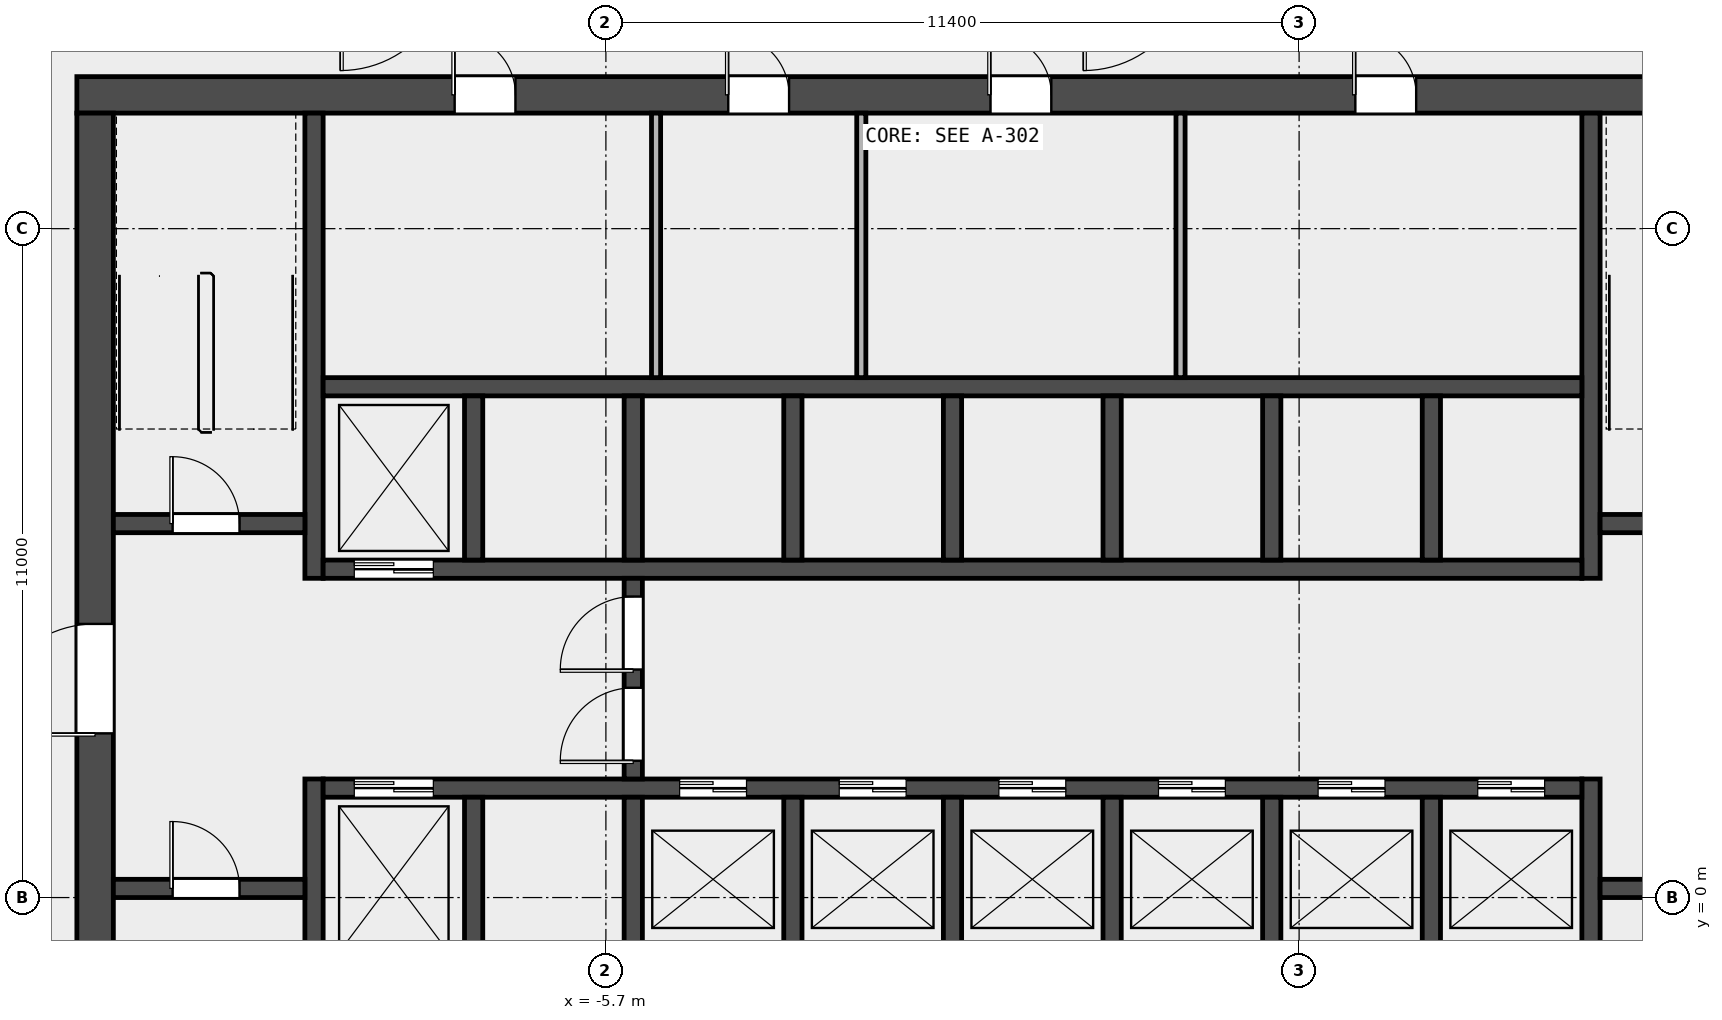
"""IFC4 building model, lengths in metres.
Left out: names, types, materials, properties, quantities, classifications, styles, units other than length and angle.
Written with IfcOpenShell. Run it as: python <this file> out.ifc"""

import sys

from ifc_helpers import new_model, si_unit, direction, frame, frame_2d, origin, place, context, subcontext, project, spatial, rectangle, extrude, element, fill, save


model = new_model("IFC4")
c1 = context("Model", 3, precision=1e-05, world=origin(), true_north=direction((0.0, 1.0)))
c2 = subcontext(c1, "Body", "Model", "MODEL_VIEW")
j1 = project(units=[si_unit("LENGTHUNIT", "METRE"), si_unit("PLANEANGLEUNIT", "RADIAN")], contexts=[c1])
p1 = place(None, origin())
s1 = spatial("IfcSite", under=j1, at=p1, CompositionType="ELEMENT")
p2 = place(p1, origin())
s2 = spatial("IfcBuilding", under=s1, at=p2, CompositionType="ELEMENT")
p3 = place(p2, frame((0.0, 0.0, 14.5)))
s3 = spatial("IfcBuildingStorey", under=s2, at=p3, CompositionType="ELEMENT", Elevation=14.5)
p4 = place(p3, frame((-14.4, 13.2, 0.0), z_axis=(0.0, 0.0, 1.0), x_axis=(1.0, 0.0, 0.0)))
e1 = element("IfcWall", 1, at=p4, inside=s3, PredefinedType="SHEAR", context=c2, shape_type="SweptSolid", body=[
    extrude(rectangle(XDim=28.8, YDim=0.6, at=frame_2d((14.4, 0.0))), origin(), (0.0, 0.0, 1.0), 5.2),
])
p5 = place(p4, frame((6.212, 0.0, 0.0)))
e2 = element("IfcOpeningElement", 2, at=p5, cuts=e1, PredefinedType="OPENING", context=c2, shape_type="SweptSolid", body=[
    extrude(rectangle(XDim=1.0, YDim=2.1, at=frame_2d((0.5, 1.05))), frame((0.0, 0.312, 0.0), z_axis=(0.0, -1.0, 0.0), x_axis=(1.0, 0.0, 0.0)), (0.0, 0.0, 1.0), 0.624),
])
p6 = place(p4, frame((10.712, 0.0, 0.0)))
e3 = element("IfcOpeningElement", 3, at=p6, cuts=e1, PredefinedType="OPENING", context=c2, shape_type="SweptSolid", body=[
    extrude(rectangle(XDim=1.0, YDim=2.1, at=frame_2d((0.5, 1.05))), frame((0.0, 0.312, 0.0), z_axis=(0.0, -1.0, 0.0), x_axis=(1.0, 0.0, 0.0)), (0.0, 0.0, 1.0), 0.624),
])
p7 = place(p4, frame((15.025, 0.0, 0.0)))
e4 = element("IfcOpeningElement", 4, at=p7, cuts=e1, PredefinedType="OPENING", context=c2, shape_type="SweptSolid", body=[
    extrude(rectangle(XDim=1.0, YDim=2.1, at=frame_2d((0.5, 1.05))), frame((0.0, 0.312, 0.0), z_axis=(0.0, -1.0, 0.0), x_axis=(1.0, 0.0, 0.0)), (0.0, 0.0, 1.0), 0.624),
])
p8 = place(p4, frame((21.025, 0.0, 0.0)))
e5 = element("IfcOpeningElement", 5, at=p8, cuts=e1, PredefinedType="OPENING", context=c2, shape_type="SweptSolid", body=[
    extrude(rectangle(XDim=1.0, YDim=2.1, at=frame_2d((0.5, 1.05))), frame((0.0, 0.312, 0.0), z_axis=(0.0, -1.0, 0.0), x_axis=(1.0, 0.0, 0.0)), (0.0, 0.0, 1.0), 0.624),
])
p9 = place(p3, frame((-14.1, -6.6, 0.0), z_axis=(0.0, 0.0, 1.0), x_axis=(0.0, 1.0, 0.0)))
e6 = element("IfcWall", 6, at=p9, inside=s3, PredefinedType="SHEAR", context=c2, shape_type="SweptSolid", body=[
    extrude(rectangle(XDim=19.5, YDim=0.6, at=frame_2d((9.75, 0.0))), origin(), (0.0, 0.0, 1.0), 5.2),
])
p10 = place(p9, frame((9.3, 0.0, 0.0)))
e7 = element("IfcOpeningElement", 7, at=p10, cuts=e6, PredefinedType="OPENING", context=c2, shape_type="SweptSolid", body=[
    extrude(rectangle(XDim=1.8, YDim=2.1, at=frame_2d((0.9, 1.05))), frame((0.0, 0.312, 0.0), z_axis=(0.0, -1.0, 0.0), x_axis=(1.0, 0.0, 0.0)), (0.0, 0.0, 1.0), 0.624),
])
p11 = place(p3, frame((-10.5, -6.6, 0.0), z_axis=(0.0, 0.0, 1.0), x_axis=(0.0, 1.0, 0.0)))
e8 = element("IfcWall", 8, at=p11, inside=s3, PredefinedType="SHEAR", context=c2, shape_type="SweptSolid", body=[
    extrude(rectangle(XDim=8.55, YDim=0.3, at=frame_2d((4.275, 0.0))), origin(), (0.0, 0.0, 1.0), 5.2),
])
p12 = place(p3, frame((-10.5, 5.25, 0.0), z_axis=(0.0, 0.0, 1.0), x_axis=(0.0, 1.0, 0.0)))
e9 = element("IfcWall", 9, at=p12, inside=s3, PredefinedType="SHEAR", context=c2, shape_type="SweptSolid", body=[
    extrude(rectangle(XDim=7.65, YDim=0.3, at=frame_2d((3.825, 0.0))), origin(), (0.0, 0.0, 1.0), 5.2),
])
p13 = place(p3, frame((10.5, -6.6, 0.0), z_axis=(0.0, 0.0, 1.0), x_axis=(0.0, 1.0, 0.0)))
e10 = element("IfcWall", 10, at=p13, inside=s3, PredefinedType="SHEAR", context=c2, shape_type="SweptSolid", body=[
    extrude(rectangle(XDim=8.55, YDim=0.3, at=frame_2d((4.275, 0.0))), origin(), (0.0, 0.0, 1.0), 5.2),
])
p14 = place(p3, frame((10.5, 5.25, 0.0), z_axis=(0.0, 0.0, 1.0), x_axis=(0.0, 1.0, 0.0)))
e11 = element("IfcWall", 11, at=p14, inside=s3, PredefinedType="SHEAR", context=c2, shape_type="SweptSolid", body=[
    extrude(rectangle(XDim=7.65, YDim=0.3, at=frame_2d((3.825, 0.0))), origin(), (0.0, 0.0, 1.0), 5.2),
])
p15 = place(p3, frame((-13.8, 0.15, 0.0), z_axis=(0.0, 0.0, 1.0), x_axis=(1.0, 0.0, 0.0)))
e12 = element("IfcWall", 12, at=p15, inside=s3, PredefinedType="SOLIDWALL", context=c2, shape_type="SweptSolid", body=[
    extrude(rectangle(XDim=3.15, YDim=0.3, at=frame_2d((1.575, 0.0))), origin(), (0.0, 0.0, 1.0), 5.2),
])
p16 = place(p15, frame((0.975, 0.0, 0.0)))
e13 = element("IfcOpeningElement", 13, at=p16, cuts=e12, PredefinedType="OPENING", context=c2, shape_type="SweptSolid", body=[
    extrude(rectangle(XDim=1.1, YDim=2.1, at=frame_2d((0.55, 1.05))), frame((0.0, 0.162, 0.0), z_axis=(0.0, -1.0, 0.0), x_axis=(1.0, 0.0, 0.0)), (0.0, 0.0, 1.0), 0.324),
])
p17 = place(p3, frame((-13.8, 6.15, 0.0), z_axis=(0.0, 0.0, 1.0), x_axis=(1.0, 0.0, 0.0)))
e14 = element("IfcWall", 14, at=p17, inside=s3, PredefinedType="SOLIDWALL", context=c2, shape_type="SweptSolid", body=[
    extrude(rectangle(XDim=3.15, YDim=0.3, at=frame_2d((1.575, 0.0))), origin(), (0.0, 0.0, 1.0), 5.2),
])
p18 = place(p17, frame((0.975, 0.0, 0.0)))
e15 = element("IfcOpeningElement", 15, at=p18, cuts=e14, PredefinedType="OPENING", context=c2, shape_type="SweptSolid", body=[
    extrude(rectangle(XDim=1.1, YDim=2.1, at=frame_2d((0.55, 1.05))), frame((0.0, 0.162, 0.0), z_axis=(0.0, -1.0, 0.0), x_axis=(1.0, 0.0, 0.0)), (0.0, 0.0, 1.0), 0.324),
])
p19 = place(p3, frame((10.65, 0.15, 0.0), z_axis=(0.0, 0.0, 1.0), x_axis=(1.0, 0.0, 0.0)))
e16 = element("IfcWall", 16, at=p19, inside=s3, PredefinedType="SOLIDWALL", context=c2, shape_type="SweptSolid", body=[
    extrude(rectangle(XDim=3.15, YDim=0.3, at=frame_2d((1.575, 0.0))), origin(), (0.0, 0.0, 1.0), 5.2),
])
p20 = place(p19, frame((1.025, 0.0, 0.0)))
e17 = element("IfcOpeningElement", 17, at=p20, cuts=e16, PredefinedType="OPENING", context=c2, shape_type="SweptSolid", body=[
    extrude(rectangle(XDim=1.1, YDim=2.1, at=frame_2d((0.55, 1.05))), frame((0.0, 0.162, 0.0), z_axis=(0.0, -1.0, 0.0), x_axis=(1.0, 0.0, 0.0)), (0.0, 0.0, 1.0), 0.324),
])
p21 = place(p3, frame((10.65, 6.15, 0.0), z_axis=(0.0, 0.0, 1.0), x_axis=(1.0, 0.0, 0.0)))
e18 = element("IfcWall", 18, at=p21, inside=s3, PredefinedType="SOLIDWALL", context=c2, shape_type="SweptSolid", body=[
    extrude(rectangle(XDim=3.15, YDim=0.3, at=frame_2d((1.575, 0.0))), origin(), (0.0, 0.0, 1.0), 5.2),
])
p22 = place(p21, frame((1.025, 0.0, 0.0)))
e19 = element("IfcOpeningElement", 19, at=p22, cuts=e18, PredefinedType="OPENING", context=c2, shape_type="SweptSolid", body=[
    extrude(rectangle(XDim=1.1, YDim=2.1, at=frame_2d((0.55, 1.05))), frame((0.0, 0.162, 0.0), z_axis=(0.0, -1.0, 0.0), x_axis=(1.0, 0.0, 0.0)), (0.0, 0.0, 1.0), 0.324),
])
p23 = place(p3, frame((-10.35, 1.8, 0.0), z_axis=(0.0, 0.0, 1.0), x_axis=(1.0, 0.0, 0.0)))
e20 = element("IfcWall", 20, at=p23, inside=s3, PredefinedType="SOLIDWALL", context=c2, shape_type="SweptSolid", body=[
    extrude(rectangle(XDim=20.7, YDim=0.3, at=frame_2d((10.35, 0.0))), origin(), (0.0, 0.0, 1.0), 5.2),
])
p24 = place(p23, frame((0.512, 0.0, 0.0)))
e21 = element("IfcOpeningElement", 21, at=p24, cuts=e20, PredefinedType="OPENING", context=c2, shape_type="SweptSolid", body=[
    extrude(rectangle(XDim=1.3, YDim=2.1, at=frame_2d((0.65, 1.05))), frame((0.0, 0.162, 0.0), z_axis=(0.0, -1.0, 0.0), x_axis=(1.0, 0.0, 0.0)), (0.0, 0.0, 1.0), 0.324),
])
p25 = place(p23, frame((5.863, 0.0, 0.0)))
e22 = element("IfcOpeningElement", 22, at=p25, cuts=e20, PredefinedType="OPENING", context=c2, shape_type="SweptSolid", body=[
    extrude(rectangle(XDim=1.1, YDim=2.1, at=frame_2d((0.55, 1.05))), frame((0.0, 0.162, 0.0), z_axis=(0.0, -1.0, 0.0), x_axis=(1.0, 0.0, 0.0)), (0.0, 0.0, 1.0), 0.324),
])
p26 = place(p23, frame((8.488, 0.0, 0.0)))
e23 = element("IfcOpeningElement", 23, at=p26, cuts=e20, PredefinedType="OPENING", context=c2, shape_type="SweptSolid", body=[
    extrude(rectangle(XDim=1.1, YDim=2.1, at=frame_2d((0.55, 1.05))), frame((0.0, 0.162, 0.0), z_axis=(0.0, -1.0, 0.0), x_axis=(1.0, 0.0, 0.0)), (0.0, 0.0, 1.0), 0.324),
])
p27 = place(p23, frame((11.113, 0.0, 0.0)))
e24 = element("IfcOpeningElement", 24, at=p27, cuts=e20, PredefinedType="OPENING", context=c2, shape_type="SweptSolid", body=[
    extrude(rectangle(XDim=1.1, YDim=2.1, at=frame_2d((0.55, 1.05))), frame((0.0, 0.162, 0.0), z_axis=(0.0, -1.0, 0.0), x_axis=(1.0, 0.0, 0.0)), (0.0, 0.0, 1.0), 0.324),
])
p28 = place(p23, frame((13.738, 0.0, 0.0)))
e25 = element("IfcOpeningElement", 25, at=p28, cuts=e20, PredefinedType="OPENING", context=c2, shape_type="SweptSolid", body=[
    extrude(rectangle(XDim=1.1, YDim=2.1, at=frame_2d((0.55, 1.05))), frame((0.0, 0.162, 0.0), z_axis=(0.0, -1.0, 0.0), x_axis=(1.0, 0.0, 0.0)), (0.0, 0.0, 1.0), 0.324),
])
p29 = place(p23, frame((16.363, 0.0, 0.0)))
e26 = element("IfcOpeningElement", 26, at=p29, cuts=e20, PredefinedType="OPENING", context=c2, shape_type="SweptSolid", body=[
    extrude(rectangle(XDim=1.1, YDim=2.1, at=frame_2d((0.55, 1.05))), frame((0.0, 0.162, 0.0), z_axis=(0.0, -1.0, 0.0), x_axis=(1.0, 0.0, 0.0)), (0.0, 0.0, 1.0), 0.324),
])
p30 = place(p23, frame((18.988, 0.0, 0.0)))
e27 = element("IfcOpeningElement", 27, at=p30, cuts=e20, PredefinedType="OPENING", context=c2, shape_type="SweptSolid", body=[
    extrude(rectangle(XDim=1.1, YDim=2.1, at=frame_2d((0.55, 1.05))), frame((0.0, 0.162, 0.0), z_axis=(0.0, -1.0, 0.0), x_axis=(1.0, 0.0, 0.0)), (0.0, 0.0, 1.0), 0.324),
])
p31 = place(p3, frame((-10.35, 5.4, 0.0), z_axis=(0.0, 0.0, 1.0), x_axis=(1.0, 0.0, 0.0)))
e28 = element("IfcWall", 28, at=p31, inside=s3, PredefinedType="SOLIDWALL", context=c2, shape_type="SweptSolid", body=[
    extrude(rectangle(XDim=20.7, YDim=0.3, at=frame_2d((10.35, 0.0))), origin(), (0.0, 0.0, 1.0), 5.2),
])
p32 = place(p31, frame((0.512, 0.0, 0.0)))
e29 = element("IfcOpeningElement", 29, at=p32, cuts=e28, PredefinedType="OPENING", context=c2, shape_type="SweptSolid", body=[
    extrude(rectangle(XDim=1.3, YDim=2.1, at=frame_2d((0.65, 1.05))), frame((0.0, 0.162, 0.0), z_axis=(0.0, -1.0, 0.0), x_axis=(1.0, 0.0, 0.0)), (0.0, 0.0, 1.0), 0.324),
])
p33 = place(p3, frame((-10.35, 8.4, 0.0), z_axis=(0.0, 0.0, 1.0), x_axis=(1.0, 0.0, 0.0)))
e30 = element("IfcWall", 30, at=p33, inside=s3, PredefinedType="SOLIDWALL", context=c2, shape_type="SweptSolid", body=[
    extrude(rectangle(XDim=20.7, YDim=0.3, at=frame_2d((10.35, 0.0))), origin(), (0.0, 0.0, 1.0), 5.2),
])
for number, where, z_axis, x_axis in (
    (31, (-7.875, -1.05, 0.0), (0.0, 0.0, 1.0), (0.0, 1.0, 0.0)),
    (32, (-5.25, -1.05, 0.0), (0.0, 0.0, 1.0), (0.0, 1.0, 0.0)),
    (33, (-2.625, -1.05, 0.0), (0.0, 0.0, 1.0), (0.0, 1.0, 0.0)),
    (34, (0.0, -1.05, 0.0), (0.0, 0.0, 1.0), (0.0, 1.0, 0.0)),
    (35, (2.625, -1.05, 0.0), (0.0, 0.0, 1.0), (0.0, 1.0, 0.0)),
    (36, (5.25, -1.05, 0.0), (0.0, 0.0, 1.0), (0.0, 1.0, 0.0)),
    (37, (7.875, -1.05, 0.0), (0.0, 0.0, 1.0), (0.0, 1.0, 0.0)),
    (38, (-7.875, 5.55, 0.0), (0.0, 0.0, 1.0), (0.0, 1.0, 0.0)),
    (39, (-5.25, 5.55, 0.0), (0.0, 0.0, 1.0), (0.0, 1.0, 0.0)),
    (40, (-2.625, 5.55, 0.0), (0.0, 0.0, 1.0), (0.0, 1.0, 0.0)),
    (41, (0.0, 5.55, 0.0), (0.0, 0.0, 1.0), (0.0, 1.0, 0.0)),
    (42, (2.625, 5.55, 0.0), (0.0, 0.0, 1.0), (0.0, 1.0, 0.0)),
    (43, (5.25, 5.55, 0.0), (0.0, 0.0, 1.0), (0.0, 1.0, 0.0)),
    (44, (7.875, 5.55, 0.0), (0.0, 0.0, 1.0), (0.0, 1.0, 0.0)),
):
    element("IfcWall", number, at=place(p3, frame(where, z_axis=z_axis, x_axis=x_axis)), inside=s3, PredefinedType="SOLIDWALL", context=c2, shape_type="SweptSolid", body=[
        extrude(rectangle(XDim=2.7, YDim=0.3, at=frame_2d((1.35, 0.0))), origin(), (0.0, 0.0, 1.0), 5.2),
    ])
p34 = place(p3, frame((-5.25, 1.95, 0.0), z_axis=(0.0, 0.0, 1.0), x_axis=(0.0, 1.0, 0.0)))
e45 = element("IfcWall", 45, at=p34, inside=s3, PredefinedType="SOLIDWALL", context=c2, shape_type="SweptSolid", body=[
    extrude(rectangle(XDim=3.3, YDim=0.3, at=frame_2d((1.65, 0.0))), origin(), (0.0, 0.0, 1.0), 5.2),
])
p35 = place(p34, frame((0.3, 0.0, 0.0)))
e46 = element("IfcOpeningElement", 46, at=p35, cuts=e45, PredefinedType="OPENING", context=c2, shape_type="SweptSolid", body=[
    extrude(rectangle(XDim=1.2, YDim=2.1, at=frame_2d((0.6, 1.05))), frame((0.0, 0.162, 0.0), z_axis=(0.0, -1.0, 0.0), x_axis=(1.0, 0.0, 0.0)), (0.0, 0.0, 1.0), 0.324),
])
p36 = place(p34, frame((1.8, 0.0, 0.0)))
e47 = element("IfcOpeningElement", 47, at=p36, cuts=e45, PredefinedType="OPENING", context=c2, shape_type="SweptSolid", body=[
    extrude(rectangle(XDim=1.2, YDim=2.1, at=frame_2d((0.6, 1.05))), frame((0.0, 0.162, 0.0), z_axis=(0.0, -1.0, 0.0), x_axis=(1.0, 0.0, 0.0)), (0.0, 0.0, 1.0), 0.324),
])
for number, where, z_axis, x_axis in (
    (48, (-4.875, 8.55, 0.0), (0.0, 0.0, 1.0), (0.0, 1.0, 0.0)),
    (49, (-1.5, 8.55, 0.0), (0.0, 0.0, 1.0), (0.0, 1.0, 0.0)),
    (50, (3.75, 8.55, 0.0), (0.0, 0.0, 1.0), (0.0, 1.0, 0.0)),
):
    element("IfcWall", number, at=place(p3, frame(where, z_axis=z_axis, x_axis=x_axis)), inside=s3, PredefinedType="PARTITIONING", context=c2, shape_type="SweptSolid", body=[
        extrude(rectangle(XDim=4.35, YDim=0.15, at=frame_2d((2.175, 0.0))), origin(), (0.0, 0.0, 1.0), 5.2),
    ])
p37 = place(p16, origin())
e51 = element("IfcDoor", 51, at=p37, inside=s3, OperationType="SINGLE_SWING_LEFT", PredefinedType="DOOR", context=c2, shape_type="SweptSolid", body=[
    extrude(rectangle(XDim=1.1, YDim=2.1, at=frame_2d((0.55, 1.05))), frame((0.0, 0.025, 0.0), z_axis=(0.0, -1.0, 0.0), x_axis=(1.0, 0.0, 0.0)), (0.0, 0.0, 1.0), 0.05),
])
fill(e13, e51)
p38 = place(p18, origin())
e52 = element("IfcDoor", 52, at=p38, inside=s3, OperationType="SINGLE_SWING_LEFT", PredefinedType="DOOR", context=c2, shape_type="SweptSolid", body=[
    extrude(rectangle(XDim=1.1, YDim=2.1, at=frame_2d((0.55, 1.05))), frame((0.0, 0.025, 0.0), z_axis=(0.0, -1.0, 0.0), x_axis=(1.0, 0.0, 0.0)), (0.0, 0.0, 1.0), 0.05),
])
fill(e15, e52)
p39 = place(p10, origin())
e53 = element("IfcDoor", 53, at=p39, inside=s3, OperationType="DOUBLE_DOOR_SINGLE_SWING", PredefinedType="DOOR", context=c2, shape_type="SweptSolid", body=[
    extrude(rectangle(XDim=1.8, YDim=2.1, at=frame_2d((0.9, 1.05))), frame((0.0, 0.025, 0.0), z_axis=(0.0, -1.0, 0.0), x_axis=(1.0, 0.0, 0.0)), (0.0, 0.0, 1.0), 0.05),
])
fill(e7, e53)
p40 = place(p35, origin())
e54 = element("IfcDoor", 54, at=p40, inside=s3, OperationType="SINGLE_SWING_LEFT", PredefinedType="DOOR", context=c2, shape_type="SweptSolid", body=[
    extrude(rectangle(XDim=1.2, YDim=2.1, at=frame_2d((0.6, 1.05))), frame((0.0, 0.025, 0.0), z_axis=(0.0, -1.0, 0.0), x_axis=(1.0, 0.0, 0.0)), (0.0, 0.0, 1.0), 0.05),
])
fill(e46, e54)
p41 = place(p36, origin())
e55 = element("IfcDoor", 55, at=p41, inside=s3, OperationType="SINGLE_SWING_RIGHT", PredefinedType="DOOR", context=c2, shape_type="SweptSolid", body=[
    extrude(rectangle(XDim=1.2, YDim=2.1, at=frame_2d((0.6, 1.05))), frame((0.0, 0.025, 0.0), z_axis=(0.0, -1.0, 0.0), x_axis=(1.0, 0.0, 0.0)), (0.0, 0.0, 1.0), 0.05),
])
fill(e47, e55)
p42 = place(p24, origin())
e56 = element("IfcDoor", 56, at=p42, inside=s3, OperationType="DOUBLE_DOOR_SLIDING", PredefinedType="DOOR", context=c2, shape_type="SweptSolid", body=[
    extrude(rectangle(XDim=1.3, YDim=2.1, at=frame_2d((0.65, 1.05))), frame((0.0, 0.025, 0.0), z_axis=(0.0, -1.0, 0.0), x_axis=(1.0, 0.0, 0.0)), (0.0, 0.0, 1.0), 0.05),
])
fill(e21, e56)
p43 = place(p25, origin())
e57 = element("IfcDoor", 57, at=p43, inside=s3, OperationType="DOUBLE_DOOR_SLIDING", PredefinedType="DOOR", context=c2, shape_type="SweptSolid", body=[
    extrude(rectangle(XDim=1.1, YDim=2.1, at=frame_2d((0.55, 1.05))), frame((0.0, 0.025, 0.0), z_axis=(0.0, -1.0, 0.0), x_axis=(1.0, 0.0, 0.0)), (0.0, 0.0, 1.0), 0.05),
])
fill(e22, e57)
p44 = place(p26, origin())
e58 = element("IfcDoor", 58, at=p44, inside=s3, OperationType="DOUBLE_DOOR_SLIDING", PredefinedType="DOOR", context=c2, shape_type="SweptSolid", body=[
    extrude(rectangle(XDim=1.1, YDim=2.1, at=frame_2d((0.55, 1.05))), frame((0.0, 0.025, 0.0), z_axis=(0.0, -1.0, 0.0), x_axis=(1.0, 0.0, 0.0)), (0.0, 0.0, 1.0), 0.05),
])
fill(e23, e58)
p45 = place(p27, origin())
e59 = element("IfcDoor", 59, at=p45, inside=s3, OperationType="DOUBLE_DOOR_SLIDING", PredefinedType="DOOR", context=c2, shape_type="SweptSolid", body=[
    extrude(rectangle(XDim=1.1, YDim=2.1, at=frame_2d((0.55, 1.05))), frame((0.0, 0.025, 0.0), z_axis=(0.0, -1.0, 0.0), x_axis=(1.0, 0.0, 0.0)), (0.0, 0.0, 1.0), 0.05),
])
fill(e24, e59)
p46 = place(p28, origin())
e60 = element("IfcDoor", 60, at=p46, inside=s3, OperationType="DOUBLE_DOOR_SLIDING", PredefinedType="DOOR", context=c2, shape_type="SweptSolid", body=[
    extrude(rectangle(XDim=1.1, YDim=2.1, at=frame_2d((0.55, 1.05))), frame((0.0, 0.025, 0.0), z_axis=(0.0, -1.0, 0.0), x_axis=(1.0, 0.0, 0.0)), (0.0, 0.0, 1.0), 0.05),
])
fill(e25, e60)
p47 = place(p29, origin())
e61 = element("IfcDoor", 61, at=p47, inside=s3, OperationType="DOUBLE_DOOR_SLIDING", PredefinedType="DOOR", context=c2, shape_type="SweptSolid", body=[
    extrude(rectangle(XDim=1.1, YDim=2.1, at=frame_2d((0.55, 1.05))), frame((0.0, 0.025, 0.0), z_axis=(0.0, -1.0, 0.0), x_axis=(1.0, 0.0, 0.0)), (0.0, 0.0, 1.0), 0.05),
])
fill(e26, e61)
p48 = place(p30, origin())
e62 = element("IfcDoor", 62, at=p48, inside=s3, OperationType="DOUBLE_DOOR_SLIDING", PredefinedType="DOOR", context=c2, shape_type="SweptSolid", body=[
    extrude(rectangle(XDim=1.1, YDim=2.1, at=frame_2d((0.55, 1.05))), frame((0.0, 0.025, 0.0), z_axis=(0.0, -1.0, 0.0), x_axis=(1.0, 0.0, 0.0)), (0.0, 0.0, 1.0), 0.05),
])
fill(e27, e62)
p49 = place(p32, origin())
e63 = element("IfcDoor", 63, at=p49, inside=s3, OperationType="DOUBLE_DOOR_SLIDING", PredefinedType="DOOR", context=c2, shape_type="SweptSolid", body=[
    extrude(rectangle(XDim=1.3, YDim=2.1, at=frame_2d((0.65, 1.05))), frame((0.0, 0.025, 0.0), z_axis=(0.0, -1.0, 0.0), x_axis=(1.0, 0.0, 0.0)), (0.0, 0.0, 1.0), 0.05),
])
fill(e29, e63)
p50 = place(p5, origin())
e64 = element("IfcDoor", 64, at=p50, inside=s3, OperationType="SINGLE_SWING_LEFT", PredefinedType="DOOR", context=c2, shape_type="SweptSolid", body=[
    extrude(rectangle(XDim=1.0, YDim=2.1, at=frame_2d((0.5, 1.05))), frame((0.0, 0.025, 0.0), z_axis=(0.0, -1.0, 0.0), x_axis=(1.0, 0.0, 0.0)), (0.0, 0.0, 1.0), 0.05),
])
fill(e2, e64)
p51 = place(p6, origin())
e65 = element("IfcDoor", 65, at=p51, inside=s3, OperationType="SINGLE_SWING_LEFT", PredefinedType="DOOR", context=c2, shape_type="SweptSolid", body=[
    extrude(rectangle(XDim=1.0, YDim=2.1, at=frame_2d((0.5, 1.05))), frame((0.0, 0.025, 0.0), z_axis=(0.0, -1.0, 0.0), x_axis=(1.0, 0.0, 0.0)), (0.0, 0.0, 1.0), 0.05),
])
fill(e3, e65)
p52 = place(p7, origin())
e66 = element("IfcDoor", 66, at=p52, inside=s3, OperationType="SINGLE_SWING_LEFT", PredefinedType="DOOR", context=c2, shape_type="SweptSolid", body=[
    extrude(rectangle(XDim=1.0, YDim=2.1, at=frame_2d((0.5, 1.05))), frame((0.0, 0.025, 0.0), z_axis=(0.0, -1.0, 0.0), x_axis=(1.0, 0.0, 0.0)), (0.0, 0.0, 1.0), 0.05),
])
fill(e4, e66)
p53 = place(p8, origin())
e67 = element("IfcDoor", 67, at=p53, inside=s3, OperationType="SINGLE_SWING_LEFT", PredefinedType="DOOR", context=c2, shape_type="SweptSolid", body=[
    extrude(rectangle(XDim=1.0, YDim=2.1, at=frame_2d((0.5, 1.05))), frame((0.0, 0.025, 0.0), z_axis=(0.0, -1.0, 0.0), x_axis=(1.0, 0.0, 0.0)), (0.0, 0.0, 1.0), 0.05),
])
fill(e5, e67)
save(model, sys.argv[1])
